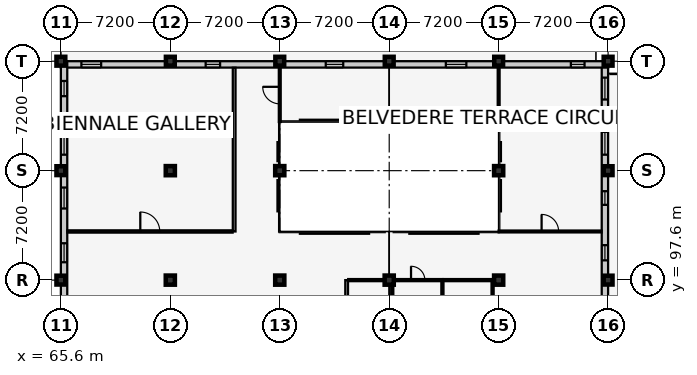
"""IFC4 building model, lengths in metres.
Left out: names, types, materials, properties, quantities, classifications, styles, units other than length and angle.
Written with IfcOpenShell. Run it as: python <this file> out.ifc"""

import sys

from ifc_helpers import new_model, si_unit, direction, frame, frame_2d, origin, origin_2d, place, context, subcontext, project, spatial, rectangle, extrude, element, fill, save


model = new_model("IFC4")
c1 = context("Model", 3, precision=1e-05, world=origin(), true_north=direction((0.0, 1.0)))
c2 = subcontext(c1, "Body", "Model", "MODEL_VIEW")
j1 = project(units=[si_unit("LENGTHUNIT", "METRE"), si_unit("PLANEANGLEUNIT", "RADIAN")], contexts=[c1])
p1 = place(None, origin())
s1 = spatial("IfcSite", under=j1, at=p1, CompositionType="ELEMENT")
p2 = place(p1, origin())
s2 = spatial("IfcBuilding", under=s1, at=p2, CompositionType="ELEMENT")
p3 = place(p2, frame((0.0, 0.0, 13.8)))
s3 = spatial("IfcBuildingStorey", under=s2, at=p3, CompositionType="ELEMENT", Elevation=13.8)
for number, where, z_axis, x_axis in (
    (1, (65.6, 97.6, 0.0), (0.0, 0.0, 1.0), (1.0, 0.0, 0.0)),
    (2, (65.6, 104.8, 0.0), (0.0, 0.0, 1.0), (1.0, 0.0, 0.0)),
    (3, (65.6, 112.0, 0.0), (0.0, 0.0, 1.0), (1.0, 0.0, 0.0)),
):
    element("IfcColumn", number, at=place(p3, frame(where, z_axis=z_axis, x_axis=x_axis)), inside=s3, PredefinedType="COLUMN", context=c2, shape_type="SweptSolid", body=[
        extrude(rectangle(XDim=0.58, YDim=0.58, at=origin_2d()), origin(), (0.0, 0.0, 1.0), 4.2),
    ])
for number, where, z_axis, x_axis in (
    (4, (72.8, 97.6, 0.0), (0.0, 0.0, 1.0), (1.0, 0.0, 0.0)),
    (5, (72.8, 104.8, 0.0), (0.0, 0.0, 1.0), (1.0, 0.0, 0.0)),
):
    element("IfcColumn", number, at=place(p3, frame(where, z_axis=z_axis, x_axis=x_axis)), inside=s3, PredefinedType="COLUMN", context=c2, shape_type="SweptSolid", body=[
        extrude(rectangle(XDim=0.6, YDim=0.6, at=origin_2d()), origin(), (0.0, 0.0, 1.0), 4.2),
    ])
p4 = place(p3, frame((72.8, 112.0, 0.0), z_axis=(0.0, 0.0, 1.0), x_axis=(1.0, 0.0, 0.0)))
e6 = element("IfcColumn", 6, at=p4, inside=s3, PredefinedType="COLUMN", context=c2, shape_type="SweptSolid", body=[
    extrude(rectangle(XDim=0.58, YDim=0.58, at=origin_2d()), origin(), (0.0, 0.0, 1.0), 4.2),
])
for number, where, z_axis, x_axis in (
    (7, (80.0, 97.6, 0.0), (0.0, 0.0, 1.0), (1.0, 0.0, 0.0)),
    (8, (80.0, 104.8, 0.0), (0.0, 0.0, 1.0), (1.0, 0.0, 0.0)),
):
    element("IfcColumn", number, at=place(p3, frame(where, z_axis=z_axis, x_axis=x_axis)), inside=s3, PredefinedType="COLUMN", context=c2, shape_type="SweptSolid", body=[
        extrude(rectangle(XDim=0.6, YDim=0.6, at=origin_2d()), origin(), (0.0, 0.0, 1.0), 4.2),
    ])
p5 = place(p3, frame((80.0, 112.0, 0.0), z_axis=(0.0, 0.0, 1.0), x_axis=(1.0, 0.0, 0.0)))
e9 = element("IfcColumn", 9, at=p5, inside=s3, PredefinedType="COLUMN", context=c2, shape_type="SweptSolid", body=[
    extrude(rectangle(XDim=0.58, YDim=0.58, at=origin_2d()), origin(), (0.0, 0.0, 1.0), 4.2),
])
p6 = place(p3, frame((87.2, 97.6, 0.0), z_axis=(0.0, 0.0, 1.0), x_axis=(1.0, 0.0, 0.0)))
e10 = element("IfcColumn", 10, at=p6, inside=s3, PredefinedType="COLUMN", context=c2, shape_type="SweptSolid", body=[
    extrude(rectangle(XDim=0.6, YDim=0.6, at=origin_2d()), origin(), (0.0, 0.0, 1.0), 4.2),
])
p7 = place(p3, frame((87.2, 112.0, 0.0), z_axis=(0.0, 0.0, 1.0), x_axis=(1.0, 0.0, 0.0)))
e11 = element("IfcColumn", 11, at=p7, inside=s3, PredefinedType="COLUMN", context=c2, shape_type="SweptSolid", body=[
    extrude(rectangle(XDim=0.58, YDim=0.58, at=origin_2d()), origin(), (0.0, 0.0, 1.0), 4.2),
])
for number, where, z_axis, x_axis in (
    (12, (94.4, 97.6, 0.0), (0.0, 0.0, 1.0), (1.0, 0.0, 0.0)),
    (13, (94.4, 104.8, 0.0), (0.0, 0.0, 1.0), (1.0, 0.0, 0.0)),
):
    element("IfcColumn", number, at=place(p3, frame(where, z_axis=z_axis, x_axis=x_axis)), inside=s3, PredefinedType="COLUMN", context=c2, shape_type="SweptSolid", body=[
        extrude(rectangle(XDim=0.6, YDim=0.6, at=origin_2d()), origin(), (0.0, 0.0, 1.0), 4.2),
    ])
for number, where, z_axis, x_axis in (
    (14, (94.4, 112.0, 0.0), (0.0, 0.0, 1.0), (1.0, 0.0, 0.0)),
    (15, (101.6, 97.6, 0.0), (0.0, 0.0, 1.0), (1.0, 0.0, 0.0)),
    (16, (101.6, 104.8, 0.0), (0.0, 0.0, 1.0), (1.0, 0.0, 0.0)),
    (17, (101.6, 112.0, 0.0), (0.0, 0.0, 1.0), (1.0, 0.0, 0.0)),
):
    element("IfcColumn", number, at=place(p3, frame(where, z_axis=z_axis, x_axis=x_axis)), inside=s3, PredefinedType="COLUMN", context=c2, shape_type="SweptSolid", body=[
        extrude(rectangle(XDim=0.58, YDim=0.58, at=origin_2d()), origin(), (0.0, 0.0, 1.0), 4.2),
    ])
p8 = place(p3, frame((101.39, 112.0, 0.0), z_axis=(0.0, 0.0, 1.0), x_axis=(0.0, -1.0, 0.0)))
e18 = element("IfcWall", 18, at=p8, inside=s3, PredefinedType="SOLIDWALL", context=c2, shape_type="SweptSolid", body=[
    extrude(rectangle(XDim=21.6, YDim=0.42, at=frame_2d((10.8, 0.0))), origin(), (0.0, 0.0, 1.0), 3.215),
])
p9 = place(p8, frame((17.3, 0.0, 0.0)))
e19 = element("IfcOpeningElement", 19, at=p9, cuts=e18, PredefinedType="OPENING", context=c2, shape_type="SweptSolid", body=[
    extrude(rectangle(XDim=1.4, YDim=2.2, at=frame_2d((0.7, 1.1))), frame((0.0, 0.222, 0.0), z_axis=(0.0, -1.0, 0.0), x_axis=(1.0, 0.0, 0.0)), (0.0, 0.0, 1.0), 0.444),
])
p10 = place(p8, frame((1.08, 0.0, 0.9)))
e20 = element("IfcOpeningElement", 20, at=p10, cuts=e18, PredefinedType="OPENING", context=c2, shape_type="SweptSolid", body=[
    extrude(rectangle(XDim=1.44, YDim=1.75, at=frame_2d((0.72, 0.875))), frame((0.0, 0.222, 0.0), z_axis=(0.0, -1.0, 0.0), x_axis=(1.0, 0.0, 0.0)), (0.0, 0.0, 1.0), 0.444),
])
p11 = place(p8, frame((4.65, 0.0, 0.9)))
e21 = element("IfcOpeningElement", 21, at=p11, cuts=e18, PredefinedType="OPENING", context=c2, shape_type="SweptSolid", body=[
    extrude(rectangle(XDim=1.5, YDim=1.75, at=frame_2d((0.75, 0.875))), frame((0.0, 0.222, 0.0), z_axis=(0.0, -1.0, 0.0), x_axis=(1.0, 0.0, 0.0)), (0.0, 0.0, 1.0), 0.444),
])
p12 = place(p8, frame((8.55, 0.0, 0.9)))
e22 = element("IfcOpeningElement", 22, at=p12, cuts=e18, PredefinedType="OPENING", context=c2, shape_type="SweptSolid", body=[
    extrude(rectangle(XDim=0.9, YDim=1.35, at=frame_2d((0.45, 0.675))), frame((0.0, 0.222, 0.0), z_axis=(0.0, -1.0, 0.0), x_axis=(1.0, 0.0, 0.0)), (0.0, 0.0, 1.0), 0.444),
])
p13 = place(p8, frame((12.1, 0.0, 0.9)))
e23 = element("IfcOpeningElement", 23, at=p13, cuts=e18, PredefinedType="OPENING", context=c2, shape_type="SweptSolid", body=[
    extrude(rectangle(XDim=1.0, YDim=1.35, at=frame_2d((0.5, 0.675))), frame((0.0, 0.222, 0.0), z_axis=(0.0, -1.0, 0.0), x_axis=(1.0, 0.0, 0.0)), (0.0, 0.0, 1.0), 0.444),
])
p14 = place(p3, frame((65.6, 111.79, 0.0), z_axis=(0.0, 0.0, 1.0), x_axis=(1.0, 0.0, 0.0)))
e24 = element("IfcWall", 24, at=p14, inside=s3, PredefinedType="SOLIDWALL", context=c2, shape_type="SweptSolid", body=[
    extrude(rectangle(XDim=36.0, YDim=0.42, at=frame_2d((18.0, 0.0))), origin(), (0.0, 0.0, 1.0), 3.175),
])
p15 = place(p14, frame((1.35, 0.0, 0.9)))
e25 = element("IfcOpeningElement", 25, at=p15, cuts=e24, PredefinedType="OPENING", context=c2, shape_type="SweptSolid", body=[
    extrude(rectangle(XDim=1.3, YDim=1.35, at=frame_2d((0.65, 0.675))), frame((0.0, 0.222, 0.0), z_axis=(0.0, -1.0, 0.0), x_axis=(1.0, 0.0, 0.0)), (0.0, 0.0, 1.0), 0.444),
])
p16 = place(p14, frame((9.525, 0.0, 0.9)))
e26 = element("IfcOpeningElement", 26, at=p16, cuts=e24, PredefinedType="OPENING", context=c2, shape_type="SweptSolid", body=[
    extrude(rectangle(XDim=0.95, YDim=1.45, at=frame_2d((0.475, 0.725))), frame((0.0, 0.222, 0.0), z_axis=(0.0, -1.0, 0.0), x_axis=(1.0, 0.0, 0.0)), (0.0, 0.0, 1.0), 0.444),
])
p17 = place(p14, frame((17.425, 0.0, 0.9)))
e27 = element("IfcOpeningElement", 27, at=p17, cuts=e24, PredefinedType="OPENING", context=c2, shape_type="SweptSolid", body=[
    extrude(rectangle(XDim=1.15, YDim=1.45, at=frame_2d((0.575, 0.725))), frame((0.0, 0.222, 0.0), z_axis=(0.0, -1.0, 0.0), x_axis=(1.0, 0.0, 0.0)), (0.0, 0.0, 1.0), 0.444),
])
p18 = place(p14, frame((25.325, 0.0, 0.9)))
e28 = element("IfcOpeningElement", 28, at=p18, cuts=e24, PredefinedType="OPENING", context=c2, shape_type="SweptSolid", body=[
    extrude(rectangle(XDim=1.35, YDim=1.45, at=frame_2d((0.675, 0.725))), frame((0.0, 0.222, 0.0), z_axis=(0.0, -1.0, 0.0), x_axis=(1.0, 0.0, 0.0)), (0.0, 0.0, 1.0), 0.444),
])
p19 = place(p14, frame((33.55, 0.0, 0.9)))
e29 = element("IfcOpeningElement", 29, at=p19, cuts=e24, PredefinedType="OPENING", context=c2, shape_type="SweptSolid", body=[
    extrude(rectangle(XDim=0.9, YDim=1.6, at=frame_2d((0.45, 0.8))), frame((0.0, 0.222, 0.0), z_axis=(0.0, -1.0, 0.0), x_axis=(1.0, 0.0, 0.0)), (0.0, 0.0, 1.0), 0.444),
])
p20 = place(p3, frame((65.81, 90.4, 0.0), z_axis=(0.0, 0.0, 1.0), x_axis=(0.0, 1.0, 0.0)))
e30 = element("IfcWall", 30, at=p20, inside=s3, PredefinedType="SOLIDWALL", context=c2, shape_type="SweptSolid", body=[
    extrude(rectangle(XDim=21.6, YDim=0.42, at=frame_2d((10.8, 0.0))), origin(), (0.0, 0.0, 1.0), 3.135),
])
p21 = place(p20, frame((1.275, 0.0, 0.9)))
e31 = element("IfcOpeningElement", 31, at=p21, cuts=e30, PredefinedType="OPENING", context=c2, shape_type="SweptSolid", body=[
    extrude(rectangle(XDim=1.05, YDim=1.6, at=frame_2d((0.525, 0.8))), frame((0.0, 0.222, 0.0), z_axis=(0.0, -1.0, 0.0), x_axis=(1.0, 0.0, 0.0)), (0.0, 0.0, 1.0), 0.444),
])
p22 = place(p20, frame((4.825, 0.0, 0.9)))
e32 = element("IfcOpeningElement", 32, at=p22, cuts=e30, PredefinedType="OPENING", context=c2, shape_type="SweptSolid", body=[
    extrude(rectangle(XDim=1.15, YDim=1.6, at=frame_2d((0.575, 0.8))), frame((0.0, 0.222, 0.0), z_axis=(0.0, -1.0, 0.0), x_axis=(1.0, 0.0, 0.0)), (0.0, 0.0, 1.0), 0.444),
])
p23 = place(p20, frame((8.375, 0.0, 0.9)))
e33 = element("IfcOpeningElement", 33, at=p23, cuts=e30, PredefinedType="OPENING", context=c2, shape_type="SweptSolid", body=[
    extrude(rectangle(XDim=1.25, YDim=1.6, at=frame_2d((0.625, 0.8))), frame((0.0, 0.222, 0.0), z_axis=(0.0, -1.0, 0.0), x_axis=(1.0, 0.0, 0.0)), (0.0, 0.0, 1.0), 0.444),
])
p24 = place(p20, frame((11.91, 0.0, 0.9)))
e34 = element("IfcOpeningElement", 34, at=p24, cuts=e30, PredefinedType="OPENING", context=c2, shape_type="SweptSolid", body=[
    extrude(rectangle(XDim=1.38, YDim=1.6, at=frame_2d((0.69, 0.8))), frame((0.0, 0.222, 0.0), z_axis=(0.0, -1.0, 0.0), x_axis=(1.0, 0.0, 0.0)), (0.0, 0.0, 1.0), 0.444),
])
p25 = place(p20, frame((15.45, 0.0, 0.9)))
e35 = element("IfcOpeningElement", 35, at=p25, cuts=e30, PredefinedType="OPENING", context=c2, shape_type="SweptSolid", body=[
    extrude(rectangle(XDim=1.5, YDim=1.6, at=frame_2d((0.75, 0.8))), frame((0.0, 0.222, 0.0), z_axis=(0.0, -1.0, 0.0), x_axis=(1.0, 0.0, 0.0)), (0.0, 0.0, 1.0), 0.444),
])
p26 = place(p20, frame((19.3, 0.0, 0.9)))
e36 = element("IfcOpeningElement", 36, at=p26, cuts=e30, PredefinedType="OPENING", context=c2, shape_type="SweptSolid", body=[
    extrude(rectangle(XDim=1.0, YDim=1.75, at=frame_2d((0.5, 0.875))), frame((0.0, 0.222, 0.0), z_axis=(0.0, -1.0, 0.0), x_axis=(1.0, 0.0, 0.0)), (0.0, 0.0, 1.0), 0.444),
])
p27 = place(p3, frame((84.4, 94.0, 0.0), z_axis=(0.0, 0.0, 1.0), x_axis=(0.0, 1.0, 0.0)))
e37 = element("IfcWall", 37, at=p27, inside=s3, PredefinedType="PARTITIONING", context=c2, shape_type="SweptSolid", body=[
    extrude(rectangle(XDim=3.6, YDim=0.18, at=frame_2d((1.8, 0.0))), origin(), (0.0, 0.0, 1.0), 3.88),
])
p28 = place(p27, frame((1.3, 0.0, 0.0)))
e38 = element("IfcOpeningElement", 38, at=p28, cuts=e37, PredefinedType="OPENING", context=c2, shape_type="SweptSolid", body=[
    extrude(rectangle(XDim=1.0, YDim=2.1, at=frame_2d((0.5, 1.05))), frame((0.0, 0.102, 0.0), z_axis=(0.0, -1.0, 0.0), x_axis=(1.0, 0.0, 0.0)), (0.0, 0.0, 1.0), 0.204),
])
p29 = place(p3, frame((84.5, 97.6, 0.0), z_axis=(0.0, 0.0, 1.0), x_axis=(1.0, 0.0, 0.0)))
e39 = element("IfcWall", 39, at=p29, inside=s3, PredefinedType="PARTITIONING", context=c2, shape_type="SweptSolid", body=[
    extrude(rectangle(XDim=2.9, YDim=0.14, at=frame_2d((1.45, 0.0))), origin(), (0.0, 0.0, 1.0), 3.005),
])
p30 = place(p3, frame((87.4, 90.83, 0.0), z_axis=(0.0, 0.0, 1.0), x_axis=(0.0, 1.0, 0.0)))
e40 = element("IfcWall", 40, at=p30, inside=s3, PredefinedType="PARTITIONING", context=c2, shape_type="SweptSolid", body=[
    extrude(rectangle(XDim=6.69, YDim=0.14, at=frame_2d((3.345, 0.0))), origin(), (0.0, 0.0, 1.0), 3.255),
])
p31 = place(p3, frame((87.48, 97.6, 0.0), z_axis=(0.0, 0.0, 1.0), x_axis=(1.0, 0.0, 0.0)))
e41 = element("IfcWall", 41, at=p31, inside=s3, PredefinedType="PARTITIONING", context=c2, shape_type="SweptSolid", body=[
    extrude(rectangle(XDim=3.22, YDim=0.14, at=frame_2d((1.61, 0.0))), origin(), (0.0, 0.0, 1.0), 3.205),
])
p32 = place(p31, frame((1.155, 0.0, 0.0)))
e42 = element("IfcOpeningElement", 42, at=p32, cuts=e41, PredefinedType="OPENING", context=c2, shape_type="SweptSolid", body=[
    extrude(rectangle(XDim=0.91, YDim=2.06, at=frame_2d((0.455, 1.03))), frame((0.0, 0.082, 0.0), z_axis=(0.0, -1.0, 0.0), x_axis=(1.0, 0.0, 0.0)), (0.0, 0.0, 1.0), 0.164),
])
p33 = place(p3, frame((90.7, 90.83, 0.0), z_axis=(0.0, 0.0, 1.0), x_axis=(0.0, 1.0, 0.0)))
e43 = element("IfcWall", 43, at=p33, inside=s3, PredefinedType="PARTITIONING", context=c2, shape_type="SweptSolid", body=[
    extrude(rectangle(XDim=6.69, YDim=0.14, at=frame_2d((3.345, 0.0))), origin(), (0.0, 0.0, 1.0), 3.595),
])
p34 = place(p3, frame((90.78, 97.6, 0.0), z_axis=(0.0, 0.0, 1.0), x_axis=(1.0, 0.0, 0.0)))
e44 = element("IfcWall", 44, at=p34, inside=s3, PredefinedType="PARTITIONING", context=c2, shape_type="SweptSolid", body=[
    extrude(rectangle(XDim=3.22, YDim=0.14, at=frame_2d((1.61, 0.0))), origin(), (0.0, 0.0, 1.0), 3.205),
])
p35 = place(p3, frame((94.0, 90.83, 0.0), z_axis=(0.0, 0.0, 1.0), x_axis=(0.0, 1.0, 0.0)))
e45 = element("IfcWall", 45, at=p35, inside=s3, PredefinedType="PARTITIONING", context=c2, shape_type="SweptSolid", body=[
    extrude(rectangle(XDim=6.69, YDim=0.14, at=frame_2d((3.345, 0.0))), origin(), (0.0, 0.0, 1.0), 3.88),
])
p36 = place(p35, frame((2.9, 0.0, 0.0)))
e46 = element("IfcOpeningElement", 46, at=p36, cuts=e45, PredefinedType="OPENING", context=c2, shape_type="SweptSolid", body=[
    extrude(rectangle(XDim=0.89, YDim=2.05, at=frame_2d((0.445, 1.025))), frame((0.0, 0.082, 0.0), z_axis=(0.0, -1.0, 0.0), x_axis=(1.0, 0.0, 0.0)), (0.0, 0.0, 1.0), 0.164),
])
p37 = place(p3, frame((77.0, 100.8, 0.0), z_axis=(0.0, 0.0, 1.0), x_axis=(0.0, 1.0, 0.0)))
e47 = element("IfcWall", 47, at=p37, inside=s3, PredefinedType="PARTITIONING", context=c2, shape_type="SweptSolid", body=[
    extrude(rectangle(XDim=10.77, YDim=0.18, at=frame_2d((5.385, 0.0))), origin(), (0.0, 0.0, 1.0), 3.88),
])
p38 = place(p3, frame((66.03, 100.8, 0.0), z_axis=(0.0, 0.0, 1.0), x_axis=(1.0, 0.0, 0.0)))
e48 = element("IfcWall", 48, at=p38, inside=s3, PredefinedType="PARTITIONING", context=c2, shape_type="SweptSolid", body=[
    extrude(rectangle(XDim=10.87, YDim=0.15, at=frame_2d((5.435, 0.0))), origin(), (0.0, 0.0, 1.0), 3.88),
])
p39 = place(p38, frame((4.795, 0.0, 0.0)))
e49 = element("IfcOpeningElement", 49, at=p39, cuts=e48, PredefinedType="OPENING", context=c2, shape_type="SweptSolid", body=[
    extrude(rectangle(XDim=1.28, YDim=2.2, at=frame_2d((0.64, 1.1))), frame((0.0, 0.087, 0.0), z_axis=(0.0, -1.0, 0.0), x_axis=(1.0, 0.0, 0.0)), (0.0, 0.0, 1.0), 0.174),
])
p40 = place(p3, frame((80.0, 108.0, 0.0), z_axis=(0.0, 0.0, 1.0), x_axis=(0.0, 1.0, 0.0)))
e50 = element("IfcWall", 50, at=p40, inside=s3, PredefinedType="PARTITIONING", context=c2, shape_type="SweptSolid", body=[
    extrude(rectangle(XDim=3.57, YDim=0.125, at=frame_2d((1.785, 0.0))), origin(), (0.0, 0.0, 1.0), 3.255),
])
p41 = place(p40, frame((1.195, 0.0, 0.0)))
e51 = element("IfcOpeningElement", 51, at=p41, cuts=e50, PredefinedType="OPENING", context=c2, shape_type="SweptSolid", body=[
    extrude(rectangle(XDim=1.12, YDim=2.15, at=frame_2d((0.56, 1.075))), frame((0.0, 0.074, 0.0), z_axis=(0.0, -1.0, 0.0), x_axis=(1.0, 0.0, 0.0)), (0.0, 0.0, 1.0), 0.149),
])
p42 = place(p3, frame((94.4, 108.0, 0.0), z_axis=(0.0, 0.0, 1.0), x_axis=(0.0, 1.0, 0.0)))
e52 = element("IfcWall", 52, at=p42, inside=s3, PredefinedType="PARTITIONING", context=c2, shape_type="SweptSolid", body=[
    extrude(rectangle(XDim=3.57, YDim=0.125, at=frame_2d((1.785, 0.0))), origin(), (0.0, 0.0, 1.0), 3.255),
])
p43 = place(p3, frame((94.4, 100.8, 0.0), z_axis=(0.0, 0.0, 1.0), x_axis=(1.0, 0.0, 0.0)))
e53 = element("IfcWall", 53, at=p43, inside=s3, PredefinedType="PARTITIONING", context=c2, shape_type="SweptSolid", body=[
    extrude(rectangle(XDim=6.77, YDim=0.125, at=frame_2d((3.385, 0.0))), origin(), (0.0, 0.0, 1.0), 3.96),
])
p44 = place(p43, frame((2.825, 0.0, 0.0)))
e54 = element("IfcOpeningElement", 54, at=p44, cuts=e53, PredefinedType="OPENING", context=c2, shape_type="SweptSolid", body=[
    extrude(rectangle(XDim=1.12, YDim=2.15, at=frame_2d((0.56, 1.075))), frame((0.0, 0.074, 0.0), z_axis=(0.0, -1.0, 0.0), x_axis=(1.0, 0.0, 0.0)), (0.0, 0.0, 1.0), 0.149),
])
p45 = place(p10, origin())
e55 = element("IfcWindow", 55, at=p45, inside=s3, PartitioningType="SINGLE_PANEL", PredefinedType="WINDOW", context=c2, shape_type="SweptSolid", body=[
    extrude(rectangle(XDim=1.44, YDim=1.75, at=frame_2d((0.72, 0.875))), frame((0.0, 0.03, 0.0), z_axis=(0.0, -1.0, 0.0), x_axis=(1.0, 0.0, 0.0)), (0.0, 0.0, 1.0), 0.06),
])
fill(e20, e55)
p46 = place(p11, origin())
e56 = element("IfcWindow", 56, at=p46, inside=s3, PartitioningType="SINGLE_PANEL", PredefinedType="WINDOW", context=c2, shape_type="SweptSolid", body=[
    extrude(rectangle(XDim=1.5, YDim=1.75, at=frame_2d((0.75, 0.875))), frame((0.0, 0.03, 0.0), z_axis=(0.0, -1.0, 0.0), x_axis=(1.0, 0.0, 0.0)), (0.0, 0.0, 1.0), 0.06),
])
fill(e21, e56)
p47 = place(p12, origin())
e57 = element("IfcWindow", 57, at=p47, inside=s3, PartitioningType="SINGLE_PANEL", PredefinedType="WINDOW", context=c2, shape_type="SweptSolid", body=[
    extrude(rectangle(XDim=0.9, YDim=1.35, at=frame_2d((0.45, 0.675))), frame((0.0, 0.03, 0.0), z_axis=(0.0, -1.0, 0.0), x_axis=(1.0, 0.0, 0.0)), (0.0, 0.0, 1.0), 0.06),
])
fill(e22, e57)
p48 = place(p13, origin())
e58 = element("IfcWindow", 58, at=p48, inside=s3, PartitioningType="SINGLE_PANEL", PredefinedType="WINDOW", context=c2, shape_type="SweptSolid", body=[
    extrude(rectangle(XDim=1.0, YDim=1.35, at=frame_2d((0.5, 0.675))), frame((0.0, 0.03, 0.0), z_axis=(0.0, -1.0, 0.0), x_axis=(1.0, 0.0, 0.0)), (0.0, 0.0, 1.0), 0.06),
])
fill(e23, e58)
p49 = place(p15, origin())
e59 = element("IfcWindow", 59, at=p49, inside=s3, PartitioningType="SINGLE_PANEL", PredefinedType="WINDOW", context=c2, shape_type="SweptSolid", body=[
    extrude(rectangle(XDim=1.3, YDim=1.35, at=frame_2d((0.65, 0.675))), frame((0.0, 0.03, 0.0), z_axis=(0.0, -1.0, 0.0), x_axis=(1.0, 0.0, 0.0)), (0.0, 0.0, 1.0), 0.06),
])
fill(e25, e59)
p50 = place(p16, origin())
e60 = element("IfcWindow", 60, at=p50, inside=s3, PartitioningType="SINGLE_PANEL", PredefinedType="WINDOW", context=c2, shape_type="SweptSolid", body=[
    extrude(rectangle(XDim=0.95, YDim=1.45, at=frame_2d((0.475, 0.725))), frame((0.0, 0.03, 0.0), z_axis=(0.0, -1.0, 0.0), x_axis=(1.0, 0.0, 0.0)), (0.0, 0.0, 1.0), 0.06),
])
fill(e26, e60)
p51 = place(p17, origin())
e61 = element("IfcWindow", 61, at=p51, inside=s3, PartitioningType="SINGLE_PANEL", PredefinedType="WINDOW", context=c2, shape_type="SweptSolid", body=[
    extrude(rectangle(XDim=1.15, YDim=1.45, at=frame_2d((0.575, 0.725))), frame((0.0, 0.03, 0.0), z_axis=(0.0, -1.0, 0.0), x_axis=(1.0, 0.0, 0.0)), (0.0, 0.0, 1.0), 0.06),
])
fill(e27, e61)
p52 = place(p18, origin())
e62 = element("IfcWindow", 62, at=p52, inside=s3, PartitioningType="SINGLE_PANEL", PredefinedType="WINDOW", context=c2, shape_type="SweptSolid", body=[
    extrude(rectangle(XDim=1.35, YDim=1.45, at=frame_2d((0.675, 0.725))), frame((0.0, 0.03, 0.0), z_axis=(0.0, -1.0, 0.0), x_axis=(1.0, 0.0, 0.0)), (0.0, 0.0, 1.0), 0.06),
])
fill(e28, e62)
p53 = place(p19, origin())
e63 = element("IfcWindow", 63, at=p53, inside=s3, PartitioningType="SINGLE_PANEL", PredefinedType="WINDOW", context=c2, shape_type="SweptSolid", body=[
    extrude(rectangle(XDim=0.9, YDim=1.6, at=frame_2d((0.45, 0.8))), frame((0.0, 0.03, 0.0), z_axis=(0.0, -1.0, 0.0), x_axis=(1.0, 0.0, 0.0)), (0.0, 0.0, 1.0), 0.06),
])
fill(e29, e63)
p54 = place(p23, origin())
e64 = element("IfcWindow", 64, at=p54, inside=s3, PartitioningType="SINGLE_PANEL", PredefinedType="WINDOW", context=c2, shape_type="SweptSolid", body=[
    extrude(rectangle(XDim=1.25, YDim=1.6, at=frame_2d((0.625, 0.8))), frame((0.0, 0.03, 0.0), z_axis=(0.0, -1.0, 0.0), x_axis=(1.0, 0.0, 0.0)), (0.0, 0.0, 1.0), 0.06),
])
fill(e33, e64)
p55 = place(p24, origin())
e65 = element("IfcWindow", 65, at=p55, inside=s3, PartitioningType="SINGLE_PANEL", PredefinedType="WINDOW", context=c2, shape_type="SweptSolid", body=[
    extrude(rectangle(XDim=1.38, YDim=1.6, at=frame_2d((0.69, 0.8))), frame((0.0, 0.03, 0.0), z_axis=(0.0, -1.0, 0.0), x_axis=(1.0, 0.0, 0.0)), (0.0, 0.0, 1.0), 0.06),
])
fill(e34, e65)
p56 = place(p25, origin())
e66 = element("IfcWindow", 66, at=p56, inside=s3, PartitioningType="SINGLE_PANEL", PredefinedType="WINDOW", context=c2, shape_type="SweptSolid", body=[
    extrude(rectangle(XDim=1.5, YDim=1.6, at=frame_2d((0.75, 0.8))), frame((0.0, 0.03, 0.0), z_axis=(0.0, -1.0, 0.0), x_axis=(1.0, 0.0, 0.0)), (0.0, 0.0, 1.0), 0.06),
])
fill(e35, e66)
p57 = place(p26, origin())
e67 = element("IfcWindow", 67, at=p57, inside=s3, PartitioningType="SINGLE_PANEL", PredefinedType="WINDOW", context=c2, shape_type="SweptSolid", body=[
    extrude(rectangle(XDim=1.0, YDim=1.75, at=frame_2d((0.5, 0.875))), frame((0.0, 0.03, 0.0), z_axis=(0.0, -1.0, 0.0), x_axis=(1.0, 0.0, 0.0)), (0.0, 0.0, 1.0), 0.06),
])
fill(e36, e67)
p58 = place(p32, origin())
e68 = element("IfcDoor", 68, at=p58, inside=s3, OperationType="SINGLE_SWING_LEFT", PredefinedType="DOOR", context=c2, shape_type="SweptSolid", body=[
    extrude(rectangle(XDim=0.91, YDim=2.06, at=frame_2d((0.455, 1.03))), frame((0.0, 0.025, 0.0), z_axis=(0.0, -1.0, 0.0), x_axis=(1.0, 0.0, 0.0)), (0.0, 0.0, 1.0), 0.05),
])
fill(e42, e68)
p59 = place(p39, origin())
e69 = element("IfcDoor", 69, at=p59, inside=s3, OperationType="SINGLE_SWING_LEFT", PredefinedType="DOOR", context=c2, shape_type="SweptSolid", body=[
    extrude(rectangle(XDim=1.28, YDim=2.2, at=frame_2d((0.64, 1.1))), frame((0.0, 0.025, 0.0), z_axis=(0.0, -1.0, 0.0), x_axis=(1.0, 0.0, 0.0)), (0.0, 0.0, 1.0), 0.05),
])
fill(e49, e69)
p60 = place(p41, origin())
e70 = element("IfcDoor", 70, at=p60, inside=s3, OperationType="SINGLE_SWING_RIGHT", PredefinedType="DOOR", context=c2, shape_type="SweptSolid", body=[
    extrude(rectangle(XDim=1.12, YDim=2.15, at=frame_2d((0.56, 1.075))), frame((0.0, 0.025, 0.0), z_axis=(0.0, -1.0, 0.0), x_axis=(1.0, 0.0, 0.0)), (0.0, 0.0, 1.0), 0.05),
])
fill(e51, e70)
p61 = place(p44, origin())
e71 = element("IfcDoor", 71, at=p61, inside=s3, OperationType="SINGLE_SWING_LEFT", PredefinedType="DOOR", context=c2, shape_type="SweptSolid", body=[
    extrude(rectangle(XDim=1.12, YDim=2.15, at=frame_2d((0.56, 1.075))), frame((0.0, 0.025, 0.0), z_axis=(0.0, -1.0, 0.0), x_axis=(1.0, 0.0, 0.0)), (0.0, 0.0, 1.0), 0.05),
])
fill(e54, e71)
save(model, sys.argv[1])
